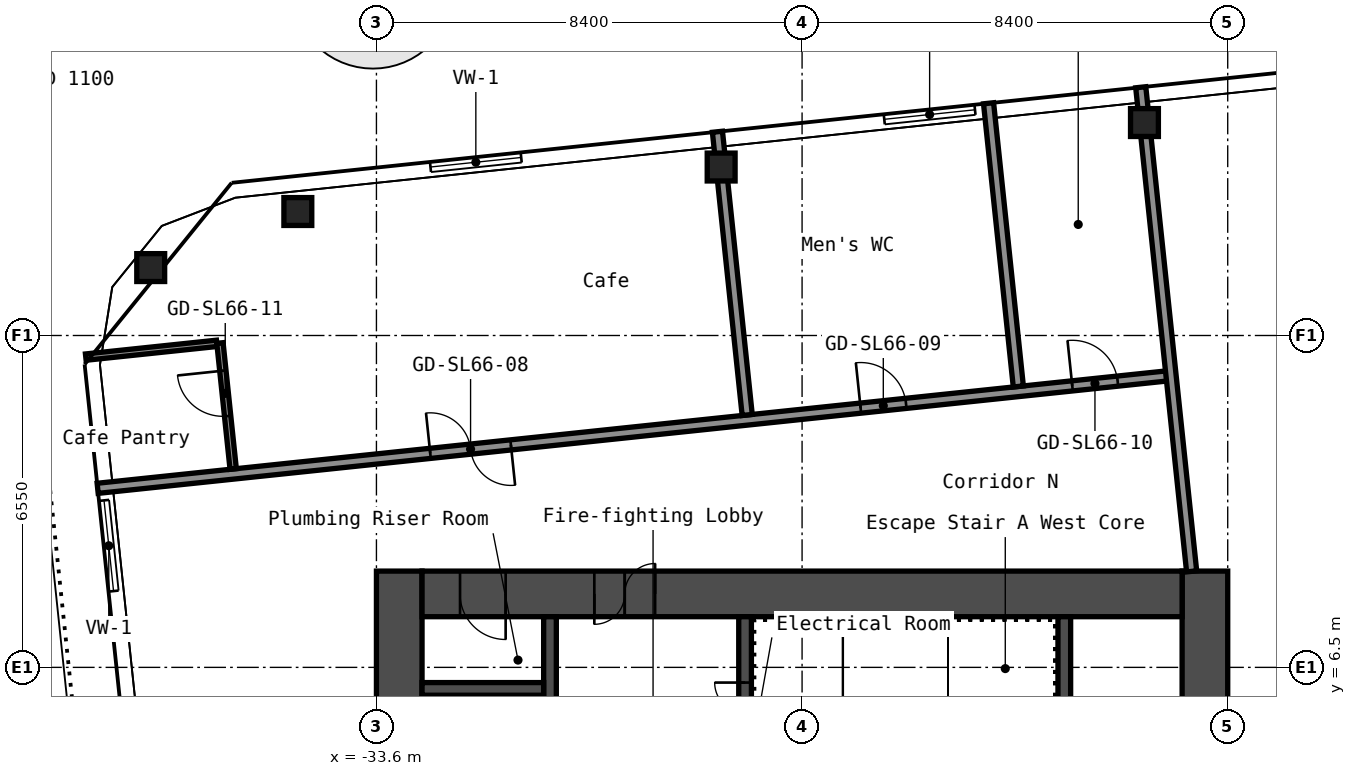
"""IFC4 building model, lengths in metres.
Left out: names, types, materials, properties, quantities, classifications, styles, units other than length and angle.
Written with IfcOpenShell. Run it as: python <this file> out.ifc"""

import sys

from ifc_helpers import new_model, si_unit, direction, frame, frame_2d, origin, origin_2d, place, context, subcontext, project, spatial, rectangle, hollow_rectangle, extrude, element, fill, save


model = new_model("IFC4")
c1 = context("Model", 3, precision=1e-05, world=origin(), true_north=direction((0.0, 1.0)))
c2 = subcontext(c1, "Body", "Model", "MODEL_VIEW")
j1 = project(units=[si_unit("LENGTHUNIT", "METRE"), si_unit("PLANEANGLEUNIT", "RADIAN")], contexts=[c1])
p1 = place(None, origin())
s1 = spatial("IfcSite", under=j1, at=p1, CompositionType="ELEMENT")
p2 = place(p1, origin())
s2 = spatial("IfcBuilding", under=s1, at=p2, CompositionType="ELEMENT")
p3 = place(p2, frame((0.0, 0.0, 232.6)))
s3 = spatial("IfcBuildingStorey", under=s2, at=p3, CompositionType="ELEMENT", Elevation=232.6)
for number, where, z_axis, x_axis in (
    (1, (-38.054, 14.39, 0.0), (0.0, 0.0, 1.0), (1.0, 0.0, 0.0)),
    (2, (-35.151, 15.497, 0.0), (0.0, 0.0, 1.0), (1.0, 0.0, 0.0)),
    (3, (-26.797, 16.375, 0.0), (0.0, 0.0, 1.0), (1.0, 0.0, 0.0)),
    (4, (-18.443, 17.253, 0.0), (0.0, 0.0, 1.0), (1.0, 0.0, 0.0)),
):
    element("IfcColumn", number, at=place(p3, frame(where, z_axis=z_axis, x_axis=x_axis)), inside=s3, PredefinedType="COLUMN", context=c2, shape_type="SweptSolid", body=[
        extrude(hollow_rectangle(XDim=0.55, YDim=0.55, WallThickness=0.022, InnerFilletRadius=0.033, OuterFilletRadius=0.055, at=origin_2d()), origin(), (0.0, 0.0, 1.0), 5.95),
    ])
p4 = place(p3, frame((-17.25, -8.4, 0.0), z_axis=(0.0, 0.0, 1.0), x_axis=(0.0, 1.0, 0.0)))
e5 = element("IfcWall", 5, at=p4, inside=s3, PredefinedType="SHEAR", context=c2, shape_type="SweptSolid", body=[
    extrude(rectangle(XDim=16.8, YDim=0.9, at=frame_2d((8.4, 0.0))), origin(), (0.0, 0.0, 1.0), 5.95),
])
p5 = place(p4, frame((8.321, 0.0, 0.0)))
e6 = element("IfcOpeningElement", 6, at=p5, cuts=e5, PredefinedType="OPENING", context=c2, shape_type="SweptSolid", body=[
    extrude(rectangle(XDim=1.6, YDim=2.1, at=frame_2d((0.8, 1.05))), frame((0.0, 0.46, 0.0), z_axis=(0.0, -1.0, 0.0), x_axis=(1.0, 0.0, 0.0)), (0.0, 0.0, 1.0), 0.92),
])
p6 = place(p3, frame((-33.15, -8.4, 0.0), z_axis=(0.0, 0.0, 1.0), x_axis=(0.0, 1.0, 0.0)))
e7 = element("IfcWall", 7, at=p6, inside=s3, PredefinedType="SHEAR", context=c2, shape_type="SweptSolid", body=[
    extrude(rectangle(XDim=16.8, YDim=0.9, at=frame_2d((8.4, 0.0))), origin(), (0.0, 0.0, 1.0), 5.95),
])
p7 = place(p3, frame((-32.7, 7.95, 0.0), z_axis=(0.0, 0.0, 1.0), x_axis=(1.0, 0.0, 0.0)))
e8 = element("IfcWall", 8, at=p7, inside=s3, PredefinedType="SHEAR", context=c2, shape_type="SweptSolid", body=[
    extrude(rectangle(XDim=15.0, YDim=0.9, at=frame_2d((7.5, 0.0))), origin(), (0.0, 0.0, 1.0), 5.95),
])
p8 = place(p7, frame((3.4, 0.0, 0.0)))
e9 = element("IfcOpeningElement", 9, at=p8, cuts=e8, PredefinedType="OPENING", context=c2, shape_type="SweptSolid", body=[
    extrude(rectangle(XDim=1.2, YDim=2.1, at=frame_2d((0.6, 1.05))), frame((0.0, 0.46, 0.0), z_axis=(0.0, -1.0, 0.0), x_axis=(1.0, 0.0, 0.0)), (0.0, 0.0, 1.0), 0.92),
])
p9 = place(p7, frame((0.75, 0.0, 0.0)))
e10 = element("IfcOpeningElement", 10, at=p9, cuts=e8, PredefinedType="OPENING", context=c2, shape_type="SweptSolid", body=[
    extrude(rectangle(XDim=0.9, YDim=2.1, at=frame_2d((0.45, 1.05))), frame((0.0, 0.46, 0.0), z_axis=(0.0, -1.0, 0.0), x_axis=(1.0, 0.0, 0.0)), (0.0, 0.0, 1.0), 0.92),
])
p10 = place(p3, frame((-20.025, 1.2, 0.0), z_axis=(0.0, 0.0, 1.0), x_axis=(0.0, 1.0, 0.0)))
e11 = element("IfcWall", 11, at=p10, inside=s3, PredefinedType="SHEAR", context=c2, shape_type="SweptSolid", body=[
    extrude(rectangle(XDim=6.3, YDim=0.25, at=frame_2d((3.15, 0.0))), origin(), (0.0, 0.0, 1.0), 5.95),
])
p11 = place(p3, frame((-26.325, 3.75, 0.0), z_axis=(0.0, 0.0, 1.0), x_axis=(0.0, 1.0, 0.0)))
e12 = element("IfcWall", 12, at=p11, inside=s3, PredefinedType="SHEAR", context=c2, shape_type="SweptSolid", body=[
    extrude(rectangle(XDim=3.75, YDim=0.25, at=frame_2d((1.875, 0.0))), origin(), (0.0, 0.0, 1.0), 5.95),
])
p12 = place(p11, frame((1.25, 0.0, 0.0)))
e13 = element("IfcOpeningElement", 13, at=p12, cuts=e12, PredefinedType="OPENING", context=c2, shape_type="SweptSolid", body=[
    extrude(rectangle(XDim=1.2, YDim=2.1, at=frame_2d((0.6, 1.05))), frame((0.0, 0.135, 0.0), z_axis=(0.0, -1.0, 0.0), x_axis=(1.0, 0.0, 0.0)), (0.0, 0.0, 1.0), 0.27),
])
p13 = place(p3, frame((-30.175, 1.45, 0.0), z_axis=(0.0, 0.0, 1.0), x_axis=(0.0, 1.0, 0.0)))
e14 = element("IfcWall", 14, at=p13, inside=s3, PredefinedType="SHEAR", context=c2, shape_type="SweptSolid", body=[
    extrude(rectangle(XDim=6.05, YDim=0.25, at=frame_2d((3.025, 0.0))), origin(), (0.0, 0.0, 1.0), 5.95),
])
p14 = place(p13, frame((2.625, 0.0, 0.0)))
e15 = element("IfcOpeningElement", 15, at=p14, cuts=e14, PredefinedType="OPENING", context=c2, shape_type="SweptSolid", body=[
    extrude(rectangle(XDim=1.1, YDim=2.1, at=frame_2d((0.55, 1.05))), frame((0.0, 0.135, 0.0), z_axis=(0.0, -1.0, 0.0), x_axis=(1.0, 0.0, 0.0)), (0.0, 0.0, 1.0), 0.27),
])
p15 = place(p3, frame((-32.7, 6.075, 0.0), z_axis=(0.0, 0.0, 1.0), x_axis=(1.0, 0.0, 0.0)))
e16 = element("IfcWall", 16, at=p15, inside=s3, PredefinedType="SHEAR", context=c2, shape_type="SweptSolid", body=[
    extrude(rectangle(XDim=2.4, YDim=0.25, at=frame_2d((1.2, 0.0))), origin(), (0.0, 0.0, 1.0), 5.95),
])
p16 = place(p3, frame((-39.102, 10.034, 0.0), z_axis=(0.0, 0.0, 1.0), x_axis=(0.994522585465, 0.104521897229, 0.0)))
e17 = element("IfcWall", 17, at=p16, inside=s3, PredefinedType="PARTITIONING", context=c2, shape_type="SweptSolid", body=[
    extrude(rectangle(XDim=21.3, YDim=0.2, at=frame_2d((10.65, 0.0))), origin(), (0.0, 0.0, 1.0), 5.95),
])
p17 = place(p16, frame((6.6, 0.0, 0.0)))
e18 = element("IfcOpeningElement", 18, at=p17, cuts=e17, PredefinedType="OPENING", context=c2, shape_type="SweptSolid", body=[
    extrude(rectangle(XDim=1.6, YDim=2.1, at=frame_2d((0.8, 1.05))), frame((0.0, 0.11, 0.0), z_axis=(0.0, -1.0, 0.0), x_axis=(1.0, 0.0, 0.0)), (0.0, 0.0, 1.0), 0.22),
])
p18 = place(p16, frame((15.14, 0.0, 0.0)))
e19 = element("IfcOpeningElement", 19, at=p18, cuts=e17, PredefinedType="OPENING", context=c2, shape_type="SweptSolid", body=[
    extrude(rectangle(XDim=0.9, YDim=2.1, at=frame_2d((0.45, 1.05))), frame((0.0, 0.11, 0.0), z_axis=(0.0, -1.0, 0.0), x_axis=(1.0, 0.0, 0.0)), (0.0, 0.0, 1.0), 0.22),
])
p19 = place(p16, frame((19.34, 0.0, 0.0)))
e20 = element("IfcOpeningElement", 20, at=p19, cuts=e17, PredefinedType="OPENING", context=c2, shape_type="SweptSolid", body=[
    extrude(rectangle(XDim=0.9, YDim=2.1, at=frame_2d((0.45, 1.05))), frame((0.0, 0.11, 0.0), z_axis=(0.0, -1.0, 0.0), x_axis=(1.0, 0.0, 0.0)), (0.0, 0.0, 1.0), 0.22),
])
p20 = place(p3, frame((-39.336, 12.624, 0.0), z_axis=(0.0, 0.0, 1.0), x_axis=(0.994523446942, 0.104513699976, 0.0)))
e21 = element("IfcWall", 21, at=p20, inside=s3, PredefinedType="PARTITIONING", context=c2, shape_type="SweptSolid", body=[
    extrude(rectangle(XDim=2.6, YDim=0.125, at=frame_2d((1.3, 0.0))), origin(), (0.0, 0.0, 1.0), 5.95),
])
p21 = place(p3, frame((-36.427, 10.416, 0.0), z_axis=(0.0, 0.0, 1.0), x_axis=(-0.104491611519, 0.994525767953, 0.0)))
e22 = element("IfcWall", 22, at=p21, inside=s3, PredefinedType="PARTITIONING", context=c2, shape_type="SweptSolid", body=[
    extrude(rectangle(XDim=2.5, YDim=0.125, at=frame_2d((1.25, 0.0))), origin(), (0.0, 0.0, 1.0), 5.95),
])
p22 = place(p21, frame((1.05, 0.0, 0.0)))
e23 = element("IfcOpeningElement", 23, at=p22, cuts=e22, PredefinedType="OPENING", context=c2, shape_type="SweptSolid", body=[
    extrude(rectangle(XDim=0.9, YDim=2.1, at=frame_2d((0.45, 1.05))), frame((0.0, 0.073, 0.0), z_axis=(0.0, -1.0, 0.0), x_axis=(1.0, 0.0, 0.0)), (0.0, 0.0, 1.0), 0.145),
])
p23 = place(p3, frame((-26.283, 11.482, 0.0), z_axis=(0.0, 0.0, 1.0), x_axis=(-0.104560413987, 0.994518536693, 0.0)))
e24 = element("IfcWall", 24, at=p23, inside=s3, PredefinedType="PARTITIONING", context=c2, shape_type="SweptSolid", body=[
    extrude(rectangle(XDim=5.62, YDim=0.2, at=frame_2d((2.81, 0.0))), origin(), (0.0, 0.0, 1.0), 5.95),
])
p24 = place(p3, frame((-20.932, 12.044, 0.0), z_axis=(0.0, 0.0, 1.0), x_axis=(-0.104512933269, 0.994523527514, 0.0)))
e25 = element("IfcWall", 25, at=p24, inside=s3, PredefinedType="PARTITIONING", context=c2, shape_type="SweptSolid", body=[
    extrude(rectangle(XDim=5.62, YDim=0.2, at=frame_2d((2.81, 0.0))), origin(), (0.0, 0.0, 1.0), 5.95),
])
p25 = place(p3, frame((-17.512, 8.395, 0.0), z_axis=(0.0, 0.0, 1.0), x_axis=(-0.104524714473, 0.994522289375, 0.0)))
e26 = element("IfcWall", 26, at=p25, inside=s3, PredefinedType="PARTITIONING", context=c2, shape_type="SweptSolid", body=[
    extrude(rectangle(XDim=9.607, YDim=0.2, at=frame_2d((4.803, 0.0))), origin(), (0.0, 0.0, 1.0), 5.95),
])
p26 = place(p3, frame((-18.506, 17.85, 4.45), z_axis=(0.0, 0.0, 1.0), x_axis=(-0.994523275226, -0.104515333968, 0.0)))
p27 = place(p26, frame((3.3, 0.0, 0.25)))
p28 = place(p27, origin())
e27 = element("IfcWindow", 27, at=p28, inside=s3, PartitioningType="SINGLE_PANEL", PredefinedType="WINDOW", context=c2, shape_type="SweptSolid", body=[
    extrude(rectangle(XDim=1.8, YDim=0.9, at=frame_2d((0.9, 0.45))), frame((0.0, 0.03, 0.0), z_axis=(0.0, -1.0, 0.0), x_axis=(1.0, 0.0, 0.0)), (0.0, 0.0, 1.0), 0.06),
])
p29 = place(p3, frame((-26.86, 16.972, 4.45), z_axis=(0.0, 0.0, 1.0), x_axis=(-0.994522701643, -0.104520791788, 0.0)))
p30 = place(p29, frame((3.905, 0.0, 0.25)))
p31 = place(p30, origin())
e28 = element("IfcWindow", 28, at=p31, inside=s3, PartitioningType="SINGLE_PANEL", PredefinedType="WINDOW", context=c2, shape_type="SweptSolid", body=[
    extrude(rectangle(XDim=1.8, YDim=0.9, at=frame_2d((0.9, 0.45))), frame((0.0, 0.03, 0.0), z_axis=(0.0, -1.0, 0.0), x_axis=(1.0, 0.0, 0.0)), (0.0, 0.0, 1.0), 0.06),
])
p32 = place(p3, frame((-39.256, 12.461, 4.45), z_axis=(0.0, 0.0, 1.0), x_axis=(0.104506598742, -0.994524193179, 0.0)))
p33 = place(p32, frame((2.68, 0.0, 0.25)))
p34 = place(p33, origin())
e29 = element("IfcWindow", 29, at=p34, inside=s3, PartitioningType="SINGLE_PANEL", PredefinedType="WINDOW", context=c2, shape_type="SweptSolid", body=[
    extrude(rectangle(XDim=1.8, YDim=0.9, at=frame_2d((0.9, 0.45))), frame((0.0, 0.03, 0.0), z_axis=(0.0, -1.0, 0.0), x_axis=(1.0, 0.0, 0.0)), (0.0, 0.0, 1.0), 0.06),
])
p35 = place(p8, origin())
e30 = element("IfcDoor", 30, at=p35, inside=s3, OperationType="DOUBLE_DOOR_SINGLE_SWING", PredefinedType="DOOR", context=c2, shape_type="SweptSolid", body=[
    extrude(rectangle(XDim=1.2, YDim=2.1, at=frame_2d((0.6, 1.05))), frame((0.0, 0.025, 0.0), z_axis=(0.0, -1.0, 0.0), x_axis=(1.0, 0.0, 0.0)), (0.0, 0.0, 1.0), 0.05),
])
fill(e9, e30)
p36 = place(p9, origin())
e31 = element("IfcDoor", 31, at=p36, inside=s3, OperationType="SINGLE_SWING_RIGHT", PredefinedType="DOOR", context=c2, shape_type="SweptSolid", body=[
    extrude(rectangle(XDim=0.9, YDim=2.1, at=frame_2d((0.45, 1.05))), frame((0.0, 0.025, 0.0), z_axis=(0.0, -1.0, 0.0), x_axis=(1.0, 0.0, 0.0)), (0.0, 0.0, 1.0), 0.05),
])
fill(e10, e31)
p37 = place(p12, origin())
e32 = element("IfcDoor", 32, at=p37, inside=s3, OperationType="DOUBLE_DOOR_SINGLE_SWING", PredefinedType="DOOR", context=c2, shape_type="SweptSolid", body=[
    extrude(rectangle(XDim=1.2, YDim=2.1, at=frame_2d((0.6, 1.05))), frame((0.0, 0.025, 0.0), z_axis=(0.0, -1.0, 0.0), x_axis=(1.0, 0.0, 0.0)), (0.0, 0.0, 1.0), 0.05),
])
fill(e13, e32)
p38 = place(p17, origin())
e33 = element("IfcDoor", 33, at=p38, inside=s3, OperationType="DOUBLE_DOOR_SINGLE_SWING", PredefinedType="DOOR", context=c2, shape_type="SweptSolid", body=[
    extrude(rectangle(XDim=1.6, YDim=2.1, at=frame_2d((0.8, 1.05))), frame((0.0, 0.025, 0.0), z_axis=(0.0, -1.0, 0.0), x_axis=(1.0, 0.0, 0.0)), (0.0, 0.0, 1.0), 0.05),
])
fill(e18, e33)
p39 = place(p18, origin())
e34 = element("IfcDoor", 34, at=p39, inside=s3, OperationType="SINGLE_SWING_RIGHT", PredefinedType="DOOR", context=c2, shape_type="SweptSolid", body=[
    extrude(rectangle(XDim=0.9, YDim=2.1, at=frame_2d((0.45, 1.05))), frame((0.0, 0.025, 0.0), z_axis=(0.0, -1.0, 0.0), x_axis=(1.0, 0.0, 0.0)), (0.0, 0.0, 1.0), 0.05),
])
fill(e19, e34)
p40 = place(p19, origin())
e35 = element("IfcDoor", 35, at=p40, inside=s3, OperationType="SINGLE_SWING_RIGHT", PredefinedType="DOOR", context=c2, shape_type="SweptSolid", body=[
    extrude(rectangle(XDim=0.9, YDim=2.1, at=frame_2d((0.45, 1.05))), frame((0.0, 0.025, 0.0), z_axis=(0.0, -1.0, 0.0), x_axis=(1.0, 0.0, 0.0)), (0.0, 0.0, 1.0), 0.05),
])
fill(e20, e35)
p41 = place(p22, origin())
e36 = element("IfcDoor", 36, at=p41, inside=s3, OperationType="SINGLE_SWING_LEFT", PredefinedType="DOOR", context=c2, shape_type="SweptSolid", body=[
    extrude(rectangle(XDim=0.9, YDim=2.1, at=frame_2d((0.45, 1.05))), frame((0.0, 0.025, 0.0), z_axis=(0.0, -1.0, 0.0), x_axis=(1.0, 0.0, 0.0)), (0.0, 0.0, 1.0), 0.05),
])
fill(e23, e36)
save(model, sys.argv[1])
